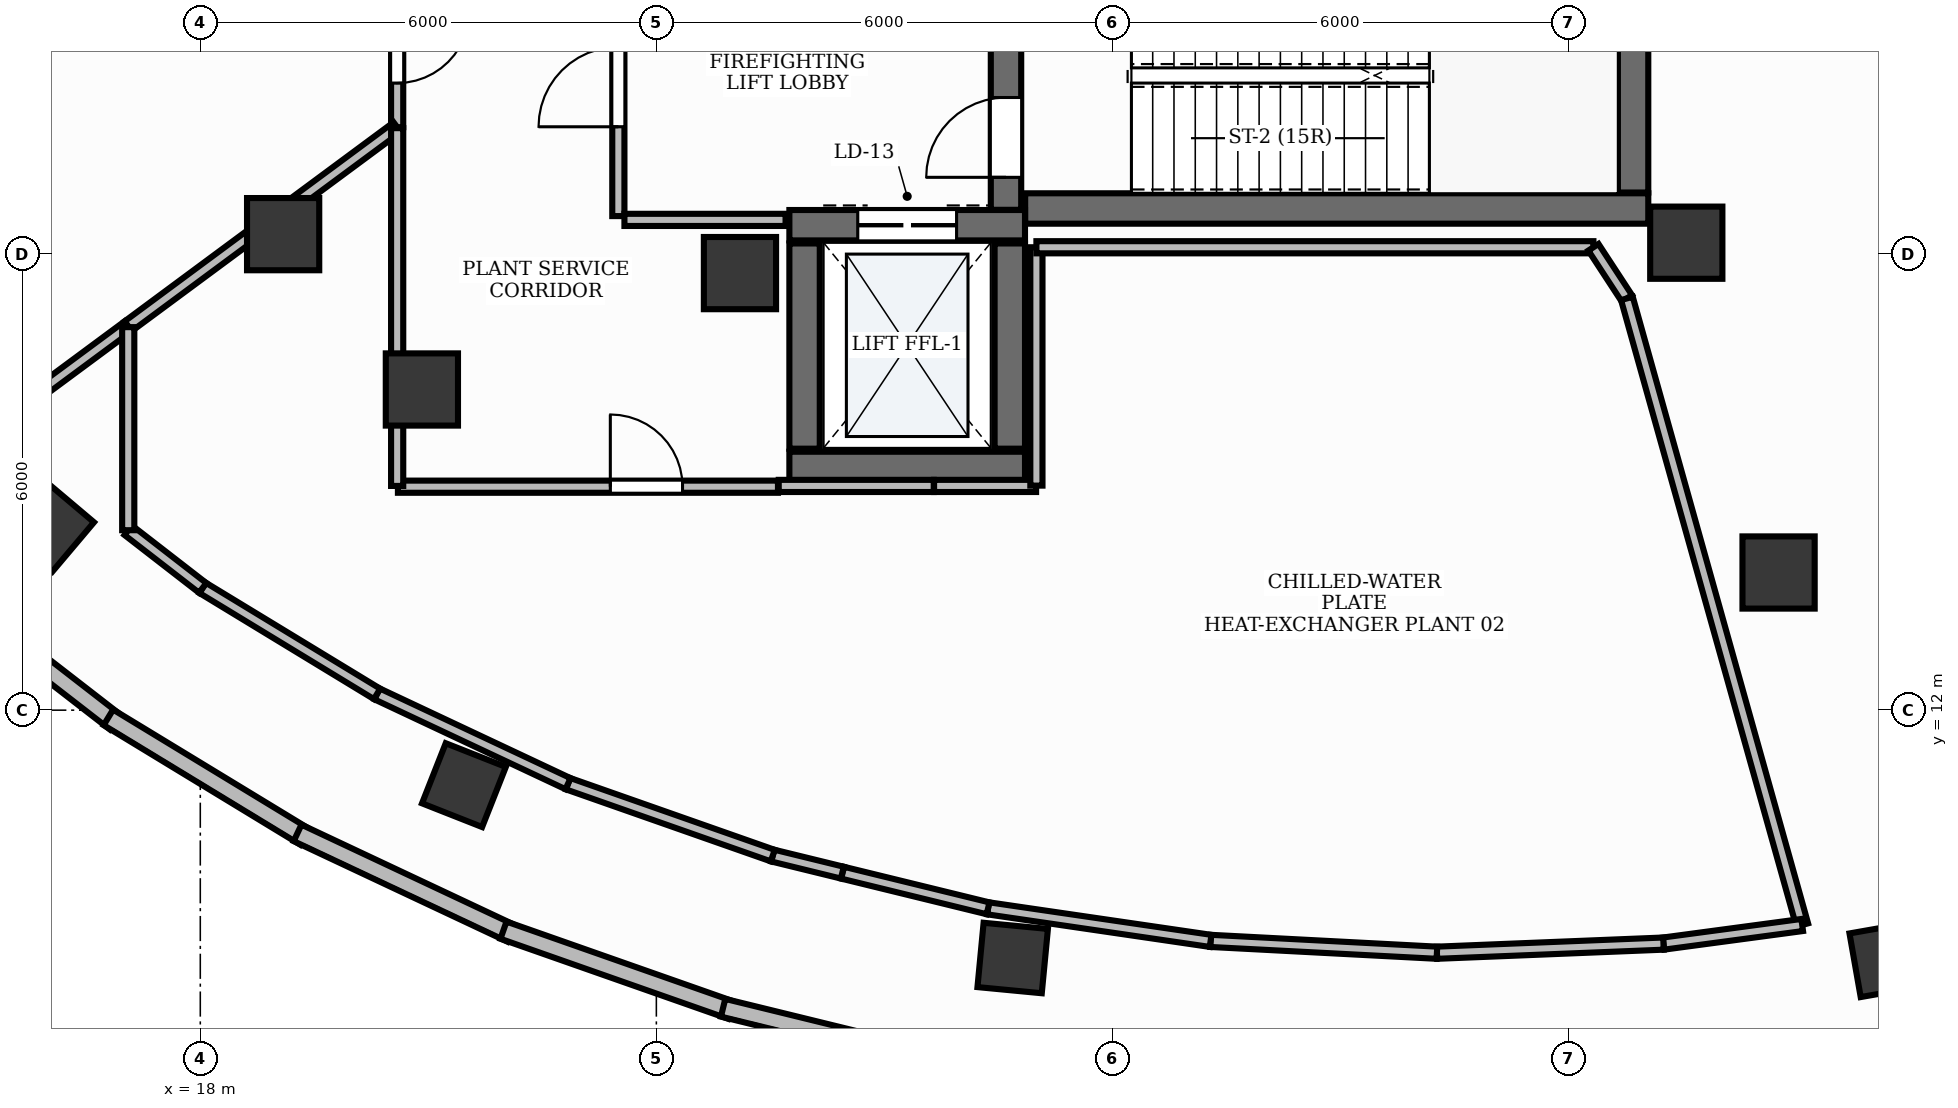
"""IFC4 building model, lengths in metres.
Left out: names, types, materials, properties, quantities, classifications, styles, units other than length and angle.
Written with IfcOpenShell. Run it as: python <this file> out.ifc"""

import sys

from ifc_helpers import new_model, si_unit, direction, frame, frame_2d, origin, origin_2d, place, context, subcontext, project, spatial, rectangle, extrude, element, fill, save


model = new_model("IFC4")
c1 = context("Model", 3, precision=1e-05, world=origin(), true_north=direction((0.0, 1.0)))
c2 = subcontext(c1, "Body", "Model", "MODEL_VIEW")
j1 = project(units=[si_unit("LENGTHUNIT", "METRE"), si_unit("PLANEANGLEUNIT", "RADIAN")], contexts=[c1])
p1 = place(None, origin())
s1 = spatial("IfcSite", under=j1, at=p1, CompositionType="ELEMENT")
p2 = place(p1, origin())
s2 = spatial("IfcBuilding", under=s1, at=p2, CompositionType="ELEMENT")
p3 = place(p2, frame((0.0, 0.0, 277.2)))
s3 = spatial("IfcBuildingStorey", under=s2, at=p3, CompositionType="ELEMENT", Elevation=277.2)
p4 = place(p3, frame((28.852, 18.6, 0.0), z_axis=(0.0, 0.0, 1.0), x_axis=(1.0, 0.0, 0.0)))
e1 = element("IfcWall", 1, at=p4, inside=s3, PredefinedType="SHEAR", context=c2, shape_type="SweptSolid", body=[
    extrude(rectangle(XDim=8.198, YDim=0.4, at=frame_2d((4.099, 0.0))), origin(), (0.0, 0.0, 1.0), 5.1),
])
p5 = place(p3, frame((36.85, 18.81, 0.0), z_axis=(0.0, 0.0, 1.0), x_axis=(0.0, 1.0, 0.0)))
e2 = element("IfcWall", 2, at=p5, inside=s3, PredefinedType="SHEAR", context=c2, shape_type="SweptSolid", body=[
    extrude(rectangle(XDim=3.08, YDim=0.4, at=frame_2d((1.54, 0.0))), origin(), (0.0, 0.0, 1.0), 5.1),
])
p6 = place(p3, frame((28.6, 18.582, 0.0), z_axis=(0.0, 0.0, 1.0), x_axis=(0.0, 1.0, 0.0)))
e3 = element("IfcWall", 3, at=p6, inside=s3, PredefinedType="SHEAR", context=c2, shape_type="SweptSolid", body=[
    extrude(rectangle(XDim=3.308, YDim=0.4, at=frame_2d((1.654, 0.0))), origin(), (0.0, 0.0, 1.0), 5.1),
])
p7 = place(p6, frame((0.428, 0.0, 0.0)))
e4 = element("IfcOpeningElement", 4, at=p7, cuts=e3, PredefinedType="OPENING", context=c2, shape_type="SweptSolid", body=[
    extrude(rectangle(XDim=1.05, YDim=2.15, at=frame_2d((0.525, 1.075))), frame((0.0, 0.215, 0.0), z_axis=(0.0, -1.0, 0.0), x_axis=(1.0, 0.0, 0.0)), (0.0, 0.0, 1.0), 0.43),
])
p8 = place(p3, frame((25.75, 15.2, 0.0), z_axis=(0.0, 0.0, 1.0), x_axis=(1.0, 0.0, 0.0)))
e5 = element("IfcWall", 5, at=p8, inside=s3, PredefinedType="SHEAR", context=c2, shape_type="SweptSolid", body=[
    extrude(rectangle(XDim=3.1, YDim=0.4, at=frame_2d((1.55, 0.0))), origin(), (0.0, 0.0, 1.0), 5.1),
])
p9 = place(p3, frame((25.75, 18.38, 0.0), z_axis=(0.0, 0.0, 1.0), x_axis=(1.0, 0.0, 0.0)))
e6 = element("IfcWall", 6, at=p9, inside=s3, PredefinedType="SHEAR", context=c2, shape_type="SweptSolid", body=[
    extrude(rectangle(XDim=3.1, YDim=0.4, at=frame_2d((1.55, 0.0))), origin(), (0.0, 0.0, 1.0), 5.1),
])
p10 = place(p9, frame((0.9, 0.0, 0.0)))
e7 = element("IfcOpeningElement", 7, at=p10, cuts=e6, PredefinedType="OPENING", context=c2, shape_type="SweptSolid", body=[
    extrude(rectangle(XDim=1.3, YDim=2.2, at=frame_2d((0.65, 1.1))), frame((0.0, 0.215, 0.0), z_axis=(0.0, -1.0, 0.0), x_axis=(1.0, 0.0, 0.0)), (0.0, 0.0, 1.0), 0.43),
])
for number, where, z_axis, x_axis in (
    (8, (25.95, 15.44, 0.0), (0.0, 0.0, 1.0), (0.0, 1.0, 0.0)),
    (9, (28.65, 15.44, 0.0), (0.0, 0.0, 1.0), (0.0, 1.0, 0.0)),
):
    element("IfcWall", number, at=place(p3, frame(where, z_axis=z_axis, x_axis=x_axis)), inside=s3, PredefinedType="SHEAR", context=c2, shape_type="SweptSolid", body=[
        extrude(rectangle(XDim=2.7, YDim=0.4, at=frame_2d((1.35, 0.0))), origin(), (0.0, 0.0, 1.0), 5.1),
    ])
for number, where, z_axis, x_axis in (
    (10, (25.1, 17.75, -0.0), (0.0, 0.0, 1.0), (1.0, 0.0, 0.0)),
    (11, (37.55, 18.15, -0.0), (0.0, 0.0, 1.0), (1.0, 0.0, 0.0)),
):
    element("IfcColumn", number, at=place(p3, frame(where, z_axis=z_axis, x_axis=x_axis)), inside=s3, PredefinedType="PILASTER", context=c2, shape_type="SweptSolid", body=[
        extrude(rectangle(XDim=0.95, YDim=0.95, at=origin_2d()), origin(), (0.0, 0.0, 1.0), 5.101),
    ])
p11 = place(p3, frame((19.09, 18.262, -0.0), z_axis=(0.0, 0.0, 1.0), x_axis=(1.0, 0.0, 0.0)))
e12 = element("IfcColumn", 12, at=p11, inside=s3, PredefinedType="COLUMN", context=c2, shape_type="SweptSolid", body=[
    extrude(rectangle(XDim=0.95, YDim=0.95, at=origin_2d()), origin(), (0.0, 0.0, 1.0), 5.101),
])
p12 = place(p3, frame((16.003, 14.421, -0.0), z_axis=(0.0, 0.0, 1.0), x_axis=(-0.764246456939, 0.644924300253, 0.0)))
e13 = element("IfcColumn", 13, at=p12, inside=s3, PredefinedType="COLUMN", context=c2, shape_type="SweptSolid", body=[
    extrude(rectangle(XDim=0.85, YDim=0.85, at=origin_2d()), origin(), (0.0, 0.0, 1.0), 5.101),
])
p13 = place(p3, frame((20.915, 16.219, -0.0), z_axis=(0.0, 0.0, 1.0), x_axis=(1.0, 0.0, 0.0)))
e14 = element("IfcColumn", 14, at=p13, inside=s3, PredefinedType="COLUMN", context=c2, shape_type="SweptSolid", body=[
    extrude(rectangle(XDim=0.95, YDim=0.95, at=origin_2d()), origin(), (0.0, 0.0, 1.0), 5.101),
])
for number, where, z_axis, x_axis in (
    (15, (21.469, 11.014, -0.0), (0.0, 0.0, 1.0), (-0.93, 0.367, 0.0)),
    (16, (28.688, 8.739, -0.0), (0.0, 0.0, 1.0), (-0.995, 0.095, 0.0)),
    (17, (40.189, 8.718, -0.0), (0.0, 0.0, 1.0), (0.985, 0.173, 0.0)),
):
    element("IfcColumn", number, at=place(p3, frame(where, z_axis=z_axis, x_axis=x_axis)), inside=s3, PredefinedType="COLUMN", context=c2, shape_type="SweptSolid", body=[
        extrude(rectangle(XDim=0.85, YDim=0.85, at=origin_2d()), origin(), (0.0, 0.0, 1.0), 5.101),
    ])
p14 = place(p3, frame((38.764, 13.811, -0.0), z_axis=(0.0, 0.0, 1.0), x_axis=(1.0, 0.0, 0.0)))
e18 = element("IfcColumn", 18, at=p14, inside=s3, PredefinedType="COLUMN", context=c2, shape_type="SweptSolid", body=[
    extrude(rectangle(XDim=0.95, YDim=0.95, at=origin_2d()), origin(), (0.0, 0.0, 1.0), 5.101),
])
p15 = place(p3, frame((14.558, 13.643, 0.0), z_axis=(0.0, 0.0, 1.0), x_axis=(0.790494374307, -0.61246930061, 0.0)))
e19 = element("IfcWall", 19, at=p15, inside=s3, PredefinedType="STANDARD", context=c2, shape_type="SweptSolid", body=[
    extrude(rectangle(XDim=2.943, YDim=0.24, at=frame_2d((1.471, 0.0))), origin(), (0.0, 0.0, 1.0), 5.1),
])
p16 = place(p3, frame((16.791, 11.905, 0.0), z_axis=(0.0, 0.0, 1.0), x_axis=(0.854534567694, -0.519394525016, 0.0)))
e20 = element("IfcWall", 20, at=p16, inside=s3, PredefinedType="STANDARD", context=c2, shape_type="SweptSolid", body=[
    extrude(rectangle(XDim=3.029, YDim=0.24, at=frame_2d((1.515, 0.0))), origin(), (0.0, 0.0, 1.0), 5.1),
])
p17 = place(p3, frame((19.28, 10.385, 0.0), z_axis=(0.0, 0.0, 1.0), x_axis=(0.904975309641, -0.425464086546, 0.0)))
e21 = element("IfcWall", 21, at=p17, inside=s3, PredefinedType="STANDARD", context=c2, shape_type="SweptSolid", body=[
    extrude(rectangle(XDim=3.108, YDim=0.24, at=frame_2d((1.554, 0.0))), origin(), (0.0, 0.0, 1.0), 5.1),
])
p18 = place(p3, frame((21.989, 9.105, 0.0), z_axis=(0.0, 0.0, 1.0), x_axis=(0.943487427594, -0.331408319104, 0.0)))
e22 = element("IfcWall", 22, at=p18, inside=s3, PredefinedType="STANDARD", context=c2, shape_type="SweptSolid", body=[
    extrude(rectangle(XDim=3.176, YDim=0.24, at=frame_2d((1.588, 0.0))), origin(), (0.0, 0.0, 1.0), 5.1),
])
p19 = place(p3, frame((24.878, 8.084, 0.0), z_axis=(0.0, 0.0, 1.0), x_axis=(0.971313704184, -0.237801783141, 0.0)))
e23 = element("IfcWall", 23, at=p19, inside=s3, PredefinedType="STANDARD", context=c2, shape_type="SweptSolid", body=[
    extrude(rectangle(XDim=3.23, YDim=0.24, at=frame_2d((1.615, 0.0))), origin(), (0.0, 0.0, 1.0), 5.1),
])
p20 = place(p3, frame((23.5, 18.5, 0.0), z_axis=(0.0, 0.0, 1.0), x_axis=(0.0, 1.0, 0.0)))
e24 = element("IfcWall", 24, at=p20, inside=s3, PredefinedType="PARTITIONING", context=c2, shape_type="SweptSolid", body=[
    extrude(rectangle(XDim=3.4, YDim=0.16, at=frame_2d((1.7, 0.0))), origin(), (0.0, 0.0, 1.0), 3.41),
])
p21 = place(p20, frame((1.175, 0.0, 0.0)))
e25 = element("IfcOpeningElement", 25, at=p21, cuts=e24, PredefinedType="OPENING", context=c2, shape_type="SweptSolid", body=[
    extrude(rectangle(XDim=1.05, YDim=2.15, at=frame_2d((0.525, 1.075))), frame((0.0, 0.095, 0.0), z_axis=(0.0, -1.0, 0.0), x_axis=(1.0, 0.0, 0.0)), (0.0, 0.0, 1.0), 0.19),
])
p22 = place(p3, frame((23.58, 18.45, 0.0), z_axis=(0.0, 0.0, 1.0), x_axis=(1.0, 0.0, 0.0)))
e26 = element("IfcWall", 26, at=p22, inside=s3, PredefinedType="PARTITIONING", context=c2, shape_type="SweptSolid", body=[
    extrude(rectangle(XDim=2.12, YDim=0.16, at=frame_2d((1.06, 0.0))), origin(), (0.0, 0.0, 1.0), 3.41),
])
p23 = place(p3, frame((20.59, 21.44, 0.0), z_axis=(0.0, 0.0, 1.0), x_axis=(0.0, -1.0, 0.0)))
e27 = element("IfcWall", 27, at=p23, inside=s3, PredefinedType="PARTITIONING", context=c2, shape_type="SweptSolid", body=[
    extrude(rectangle(XDim=1.771, YDim=0.16, at=frame_2d((0.885, 0.0))), origin(), (0.0, 0.0, 1.0), 3.41),
])
p24 = place(p23, frame((0.24, 0.0, 0.0)))
e28 = element("IfcOpeningElement", 28, at=p24, cuts=e27, PredefinedType="OPENING", context=c2, shape_type="SweptSolid", body=[
    extrude(rectangle(XDim=0.95, YDim=2.15, at=frame_2d((0.475, 1.075))), frame((0.0, 0.095, 0.0), z_axis=(0.0, -1.0, 0.0), x_axis=(1.0, 0.0, 0.0)), (0.0, 0.0, 1.0), 0.19),
])
p25 = place(p3, frame((20.6, 14.94, 0.0), z_axis=(0.0, 0.0, 1.0), x_axis=(1.0, 0.0, 0.0)))
e29 = element("IfcWall", 29, at=p25, inside=s3, PredefinedType="PARTITIONING", context=c2, shape_type="SweptSolid", body=[
    extrude(rectangle(XDim=5.0, YDim=0.16, at=frame_2d((2.5, 0.0))), origin(), (0.0, 0.0, 1.0), 3.41),
])
p26 = place(p25, frame((2.794, 0.0, 0.0)))
e30 = element("IfcOpeningElement", 30, at=p26, cuts=e29, PredefinedType="OPENING", context=c2, shape_type="SweptSolid", body=[
    extrude(rectangle(XDim=0.95, YDim=2.15, at=frame_2d((0.475, 1.075))), frame((0.0, 0.095, 0.0), z_axis=(0.0, -1.0, 0.0), x_axis=(1.0, 0.0, 0.0)), (0.0, 0.0, 1.0), 0.19),
])
p27 = place(p3, frame((20.59, 19.669, 0.0), z_axis=(0.0, 0.0, 1.0), x_axis=(-0.803870543648, -0.594804294752, 0.0)))
e31 = element("IfcWall", 31, at=p27, inside=s3, PredefinedType="PARTITIONING", context=c2, shape_type="SweptSolid", body=[
    extrude(rectangle(XDim=4.401, YDim=0.16, at=frame_2d((2.201, 0.0))), origin(), (0.0, 0.0, 1.0), 3.41),
])
p28 = place(p3, frame((17.048, 17.048, 0.0), z_axis=(0.0, 0.0, 1.0), x_axis=(-0.803879877865, -0.594791679467, 0.0)))
e32 = element("IfcWall", 32, at=p28, inside=s3, PredefinedType="PARTITIONING", context=c2, shape_type="SweptSolid", body=[
    extrude(rectangle(XDim=2.09, YDim=0.16, at=frame_2d((1.045, 0.0))), origin(), (0.0, 0.0, 1.0), 3.41),
])
p29 = place(p3, frame((27.654, 14.95, 0.0), z_axis=(0.0, 0.0, 1.0), x_axis=(1.0, 0.0, 0.0)))
e33 = element("IfcWall", 33, at=p29, inside=s3, PredefinedType="PARTITIONING", context=c2, shape_type="SweptSolid", body=[
    extrude(rectangle(XDim=1.342, YDim=0.16, at=frame_2d((0.671, 0.0))), origin(), (0.0, 0.0, 1.0), 3.41),
])
p30 = place(p3, frame((29.0, 14.954, 0.0), z_axis=(0.0, 0.0, 1.0), x_axis=(0.0, 1.0, 0.0)))
e34 = element("IfcWall", 34, at=p30, inside=s3, PredefinedType="PARTITIONING", context=c2, shape_type="SweptSolid", body=[
    extrude(rectangle(XDim=3.136, YDim=0.16, at=frame_2d((1.568, 0.0))), origin(), (0.0, 0.0, 1.0), 3.41),
])
p31 = place(p3, frame((29.0, 18.09, 0.0), z_axis=(0.0, 0.0, 1.0), x_axis=(1.0, 0.0, 0.0)))
e35 = element("IfcWall", 35, at=p31, inside=s3, PredefinedType="PARTITIONING", context=c2, shape_type="SweptSolid", body=[
    extrude(rectangle(XDim=7.328, YDim=0.16, at=frame_2d((3.664, 0.0))), origin(), (0.0, 0.0, 1.0), 3.41),
])
p32 = place(p3, frame((36.328, 18.09, 0.0), z_axis=(0.0, 0.0, 1.0), x_axis=(0.54753554432, -0.836782425548, 0.0)))
e36 = element("IfcWall", 36, at=p32, inside=s3, PredefinedType="PARTITIONING", context=c2, shape_type="SweptSolid", body=[
    extrude(rectangle(XDim=0.804, YDim=0.16, at=frame_2d((0.402, 0.0))), origin(), (0.0, 0.0, 1.0), 3.41),
])
p33 = place(p3, frame((36.769, 17.417, 0.0), z_axis=(0.0, 0.0, 1.0), x_axis=(0.269454298841, -0.963013177914, 0.0)))
e37 = element("IfcWall", 37, at=p33, inside=s3, PredefinedType="PARTITIONING", context=c2, shape_type="SweptSolid", body=[
    extrude(rectangle(XDim=8.56, YDim=0.16, at=frame_2d((4.28, 0.0))), origin(), (0.0, 0.0, 1.0), 3.41),
])
p34 = place(p3, frame((39.075, 9.174, 0.0), z_axis=(0.0, 0.0, 1.0), x_axis=(-0.991157137256, -0.132693365573, 0.0)))
e38 = element("IfcWall", 38, at=p34, inside=s3, PredefinedType="PARTITIONING", context=c2, shape_type="SweptSolid", body=[
    extrude(rectangle(XDim=1.842, YDim=0.16, at=frame_2d((0.921, 0.0))), origin(), (0.0, 0.0, 1.0), 3.41),
])
p35 = place(p3, frame((37.25, 8.929, 0.0), z_axis=(0.0, 0.0, 1.0), x_axis=(-0.999188752092, -0.040272046042, 0.0)))
e39 = element("IfcWall", 39, at=p35, inside=s3, PredefinedType="PARTITIONING", context=c2, shape_type="SweptSolid", body=[
    extrude(rectangle(XDim=2.983, YDim=0.16, at=frame_2d((1.491, 0.0))), origin(), (0.0, 0.0, 1.0), 3.41),
])
p36 = place(p3, frame((34.269, 8.809, 0.0), z_axis=(0.0, 0.0, 1.0), x_axis=(-0.998634293536, 0.052245074151, 0.0)))
e40 = element("IfcWall", 40, at=p36, inside=s3, PredefinedType="PARTITIONING", context=c2, shape_type="SweptSolid", body=[
    extrude(rectangle(XDim=2.981, YDim=0.16, at=frame_2d((1.491, 0.0))), origin(), (0.0, 0.0, 1.0), 3.41),
])
p37 = place(p3, frame((31.292, 8.965, 0.0), z_axis=(0.0, 0.0, 1.0), x_axis=(-0.989458468806, 0.144816913748, 0.0)))
e41 = element("IfcWall", 41, at=p37, inside=s3, PredefinedType="PARTITIONING", context=c2, shape_type="SweptSolid", body=[
    extrude(rectangle(XDim=2.959, YDim=0.16, at=frame_2d((1.479, 0.0))), origin(), (0.0, 0.0, 1.0), 3.41),
])
p38 = place(p3, frame((28.364, 9.393, 0.0), z_axis=(0.0, 0.0, 1.0), x_axis=(-0.971304908144, 0.237837708144, 0.0)))
e42 = element("IfcWall", 42, at=p38, inside=s3, PredefinedType="PARTITIONING", context=c2, shape_type="SweptSolid", body=[
    extrude(rectangle(XDim=1.97, YDim=0.16, at=frame_2d((0.985, 0.0))), origin(), (0.0, 0.0, 1.0), 3.41),
])
p39 = place(p3, frame((26.447, 9.863, 0.0), z_axis=(0.0, 0.0, 1.0), x_axis=(-0.97128997965, 0.237898666307, 0.0)))
e43 = element("IfcWall", 43, at=p39, inside=s3, PredefinedType="PARTITIONING", context=c2, shape_type="SweptSolid", body=[
    extrude(rectangle(XDim=0.942, YDim=0.16, at=frame_2d((0.471, 0.0))), origin(), (0.0, 0.0, 1.0), 3.41),
])
p40 = place(p3, frame((25.531, 10.087, 0.0), z_axis=(0.0, 0.0, 1.0), x_axis=(-0.94348038034, 0.331428381273, 0.0)))
e44 = element("IfcWall", 44, at=p40, inside=s3, PredefinedType="PARTITIONING", context=c2, shape_type="SweptSolid", body=[
    extrude(rectangle(XDim=2.854, YDim=0.16, at=frame_2d((1.427, 0.0))), origin(), (0.0, 0.0, 1.0), 3.41),
])
p41 = place(p3, frame((22.838, 11.033, 0.0), z_axis=(0.0, 0.0, 1.0), x_axis=(-0.904982057936, 0.425449732416, 0.0)))
e45 = element("IfcWall", 45, at=p41, inside=s3, PredefinedType="PARTITIONING", context=c2, shape_type="SweptSolid", body=[
    extrude(rectangle(XDim=2.776, YDim=0.16, at=frame_2d((1.388, 0.0))), origin(), (0.0, 0.0, 1.0), 3.41),
])
p42 = place(p3, frame((20.326, 12.214, 0.0), z_axis=(0.0, 0.0, 1.0), x_axis=(-0.854493447328, 0.519462172322, 0.0)))
e46 = element("IfcWall", 46, at=p42, inside=s3, PredefinedType="PARTITIONING", context=c2, shape_type="SweptSolid", body=[
    extrude(rectangle(XDim=2.685, YDim=0.16, at=frame_2d((1.342, 0.0))), origin(), (0.0, 0.0, 1.0), 3.41),
])
p43 = place(p3, frame((18.031, 13.608, 0.0), z_axis=(0.0, 0.0, 1.0), x_axis=(-0.79053906344, 0.61241161744, 0.0)))
e47 = element("IfcWall", 47, at=p43, inside=s3, PredefinedType="PARTITIONING", context=c2, shape_type="SweptSolid", body=[
    extrude(rectangle(XDim=1.239, YDim=0.16, at=frame_2d((0.62, 0.0))), origin(), (0.0, 0.0, 1.0), 3.41),
])
p44 = place(p3, frame((17.052, 14.367, 0.0), z_axis=(0.0, 0.0, 1.0), x_axis=(0.0, 1.0, 0.0)))
e48 = element("IfcWall", 48, at=p44, inside=s3, PredefinedType="PARTITIONING", context=c2, shape_type="SweptSolid", body=[
    extrude(rectangle(XDim=2.672, YDim=0.16, at=frame_2d((1.336, 0.0))), origin(), (0.0, 0.0, 1.0), 3.41),
])
p45 = place(p3, frame((20.59, 19.657, 0.0), z_axis=(0.0, 0.0, 1.0), x_axis=(0.0, -1.0, 0.0)))
e49 = element("IfcWall", 49, at=p45, inside=s3, PredefinedType="PARTITIONING", context=c2, shape_type="SweptSolid", body=[
    extrude(rectangle(XDim=4.707, YDim=0.16, at=frame_2d((2.354, 0.0))), origin(), (0.0, 0.0, 1.0), 3.41),
])
p46 = place(p3, frame((25.61, 14.95, 0.0), z_axis=(0.0, 0.0, 1.0), x_axis=(1.0, 0.0, 0.0)))
e50 = element("IfcWall", 50, at=p46, inside=s3, PredefinedType="PARTITIONING", context=c2, shape_type="SweptSolid", body=[
    extrude(rectangle(XDim=2.039, YDim=0.16, at=frame_2d((1.02, 0.0))), origin(), (0.0, 0.0, 1.0), 3.41),
])
p47 = place(p7, origin())
e51 = element("IfcDoor", 51, at=p47, inside=s3, OperationType="SINGLE_SWING_LEFT", PredefinedType="DOOR", context=c2, shape_type="SweptSolid", body=[
    extrude(rectangle(XDim=1.05, YDim=2.15, at=frame_2d((0.525, 1.075))), frame((0.0, 0.025, 0.0), z_axis=(0.0, -1.0, 0.0), x_axis=(1.0, 0.0, 0.0)), (0.0, 0.0, 1.0), 0.05),
])
fill(e4, e51)
p48 = place(p10, origin())
e52 = element("IfcDoor", 52, at=p48, inside=s3, OperationType="DOUBLE_DOOR_SLIDING", PredefinedType="DOOR", context=c2, shape_type="SweptSolid", body=[
    extrude(rectangle(XDim=1.3, YDim=2.2, at=frame_2d((0.65, 1.1))), frame((0.0, 0.025, 0.0), z_axis=(0.0, -1.0, 0.0), x_axis=(1.0, 0.0, 0.0)), (0.0, 0.0, 1.0), 0.05),
])
fill(e7, e52)
p49 = place(p21, origin())
e53 = element("IfcDoor", 53, at=p49, inside=s3, OperationType="SINGLE_SWING_LEFT", PredefinedType="DOOR", context=c2, shape_type="SweptSolid", body=[
    extrude(rectangle(XDim=1.05, YDim=2.15, at=frame_2d((0.525, 1.075))), frame((0.0, 0.025, 0.0), z_axis=(0.0, -1.0, 0.0), x_axis=(1.0, 0.0, 0.0)), (0.0, 0.0, 1.0), 0.05),
])
fill(e25, e53)
p50 = place(p24, origin())
e54 = element("IfcDoor", 54, at=p50, inside=s3, OperationType="SINGLE_SWING_LEFT", PredefinedType="DOOR", context=c2, shape_type="SweptSolid", body=[
    extrude(rectangle(XDim=0.95, YDim=2.15, at=frame_2d((0.475, 1.075))), frame((0.0, 0.025, 0.0), z_axis=(0.0, -1.0, 0.0), x_axis=(1.0, 0.0, 0.0)), (0.0, 0.0, 1.0), 0.05),
])
fill(e28, e54)
p51 = place(p26, origin())
e55 = element("IfcDoor", 55, at=p51, inside=s3, OperationType="SINGLE_SWING_LEFT", PredefinedType="DOOR", context=c2, shape_type="SweptSolid", body=[
    extrude(rectangle(XDim=0.95, YDim=2.15, at=frame_2d((0.475, 1.075))), frame((0.0, 0.025, 0.0), z_axis=(0.0, -1.0, 0.0), x_axis=(1.0, 0.0, 0.0)), (0.0, 0.0, 1.0), 0.05),
])
fill(e30, e55)
save(model, sys.argv[1])
